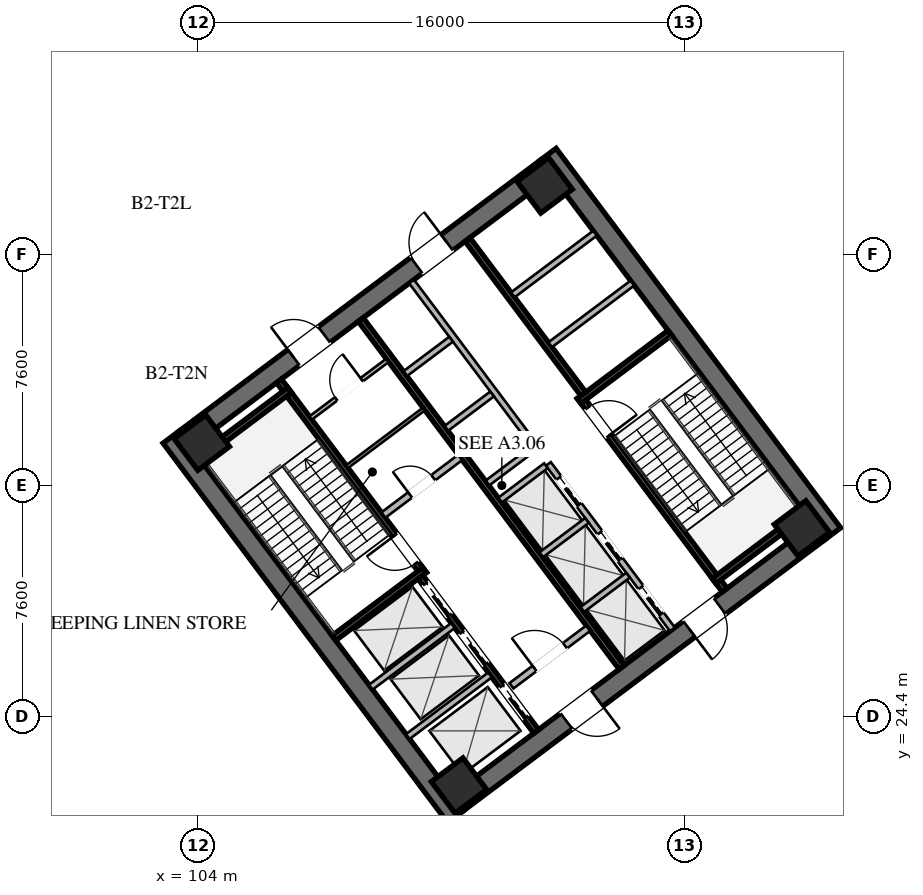
"""IFC4 building model, lengths in metres.
Left out: names, types, materials, properties, quantities, classifications, styles, units other than length and angle.
Written with IfcOpenShell. Run it as: python <this file> out.ifc"""

import sys

from ifc_helpers import new_model, si_unit, direction, frame, frame_2d, origin, origin_2d, place, context, subcontext, project, spatial, rectangle, hollow_rectangle, extrude, element, fill, save


model = new_model("IFC4")
c1 = context("Model", 3, precision=1e-05, world=origin(), true_north=direction((0.0, 1.0)))
c2 = subcontext(c1, "Body", "Model", "MODEL_VIEW")
j1 = project(units=[si_unit("LENGTHUNIT", "METRE"), si_unit("PLANEANGLEUNIT", "RADIAN")], contexts=[c1])
p1 = place(None, origin())
s1 = spatial("IfcSite", under=j1, at=p1, CompositionType="ELEMENT")
p2 = place(p1, origin())
s2 = spatial("IfcBuilding", under=s1, at=p2, CompositionType="ELEMENT")
p3 = place(p2, frame((0.0, 0.0, -11.0)))
s3 = spatial("IfcBuildingStorey", under=s2, at=p3, CompositionType="ELEMENT", Elevation=-11.0)
for number, where, z_axis, x_axis in (
    (1, (112.476, 21.107, 0.0), (0.0, 0.0, 1.0), (-0.6, 0.8, 0.0)),
    (2, (115.524, 42.893, 0.0), (0.0, 0.0, 1.0), (0.6, -0.8, 0.0)),
):
    element("IfcWall", number, at=place(p3, frame(where, z_axis=z_axis, x_axis=x_axis)), inside=s3, PredefinedType="SHEAR", context=c2, shape_type="SweptSolid", body=[
        extrude(rectangle(XDim=15.6, YDim=0.65, at=frame_2d((7.8, 0.0))), origin(), (0.0, 0.0, 1.0), 5.5),
    ])
p4 = place(p3, frame((124.429, 30.478, 0.0), z_axis=(0.0, 0.0, 1.0), x_axis=(-0.799998028465, -0.600002628705, 0.0)))
e3 = element("IfcWall", 3, at=p4, inside=s3, PredefinedType="SHEAR", context=c2, shape_type="SweptSolid", body=[
    extrude(rectangle(XDim=14.86, YDim=0.65, at=frame_2d((7.43, 0.0))), origin(), (0.0, 0.0, 1.0), 5.5),
])
p5 = place(p4, frame((9.13, 0.0, 0.0)))
e4 = element("IfcOpeningElement", 4, at=p5, cuts=e3, PredefinedType="OPENING", context=c2, shape_type="SweptSolid", body=[
    extrude(rectangle(XDim=1.25, YDim=2.25, at=frame_2d((0.625, 1.125))), frame((0.0, 0.335, 0.0), z_axis=(0.0, -1.0, 0.0), x_axis=(1.0, 0.0, 0.0)), (0.0, 0.0, 1.0), 0.67),
])
p6 = place(p4, frame((4.08, 0.0, 0.0)))
e5 = element("IfcOpeningElement", 5, at=p6, cuts=e3, PredefinedType="OPENING", context=c2, shape_type="SweptSolid", body=[
    extrude(rectangle(XDim=1.25, YDim=2.25, at=frame_2d((0.625, 1.125))), frame((0.0, 0.335, 0.0), z_axis=(0.0, -1.0, 0.0), x_axis=(1.0, 0.0, 0.0)), (0.0, 0.0, 1.0), 0.67),
])
p7 = place(p3, frame((103.571, 33.522, 0.0), z_axis=(0.0, 0.0, 1.0), x_axis=(0.799998028465, 0.600002628705, 0.0)))
e6 = element("IfcWall", 6, at=p7, inside=s3, PredefinedType="SHEAR", context=c2, shape_type="SweptSolid", body=[
    extrude(rectangle(XDim=14.86, YDim=0.65, at=frame_2d((7.43, 0.0))), origin(), (0.0, 0.0, 1.0), 5.5),
])
p8 = place(p7, frame((4.48, 0.0, 0.0)))
e7 = element("IfcOpeningElement", 7, at=p8, cuts=e6, PredefinedType="OPENING", context=c2, shape_type="SweptSolid", body=[
    extrude(rectangle(XDim=1.25, YDim=2.25, at=frame_2d((0.625, 1.125))), frame((0.0, 0.335, 0.0), z_axis=(0.0, -1.0, 0.0), x_axis=(1.0, 0.0, 0.0)), (0.0, 0.0, 1.0), 0.67),
])
p9 = place(p7, frame((9.53, 0.0, 0.0)))
e8 = element("IfcOpeningElement", 8, at=p9, cuts=e6, PredefinedType="OPENING", context=c2, shape_type="SweptSolid", body=[
    extrude(rectangle(XDim=1.25, YDim=2.25, at=frame_2d((0.625, 1.125))), frame((0.0, 0.335, 0.0), z_axis=(0.0, -1.0, 0.0), x_axis=(1.0, 0.0, 0.0)), (0.0, 0.0, 1.0), 0.67),
])
for number, where, z_axis, x_axis in (
    (9, (112.59, 22.13, 0.0), (0.0, 0.0, 1.0), (0.8, 0.6, 0.0)),
    (10, (123.87, 30.59, 0.0), (0.0, 0.0, 1.0), (0.8, 0.6, 0.0)),
    (11, (115.41, 41.87, 0.0), (0.0, 0.0, 1.0), (0.8, 0.6, 0.0)),
    (12, (104.13, 33.41, 0.0), (0.0, 0.0, 1.0), (0.8, 0.6, 0.0)),
):
    element("IfcColumn", number, at=place(p3, frame(where, z_axis=z_axis, x_axis=x_axis)), inside=s3, PredefinedType="COLUMN", context=c2, shape_type="SweptSolid", body=[
        extrude(hollow_rectangle(XDim=1.3, YDim=1.3, WallThickness=0.05, at=origin_2d()), origin(), (0.0, 0.0, 1.0), 5.24),
    ])
p10 = place(p3, frame((111.44, 29.08, 0.0), z_axis=(0.0, 0.0, 1.0), x_axis=(-0.600009827119, 0.799992629566, 0.0)))
e13 = element("IfcWall", 13, at=p10, inside=s3, PredefinedType="SHEAR", context=c2, shape_type="SweptSolid", body=[
    extrude(rectangle(XDim=7.95, YDim=0.2, at=frame_2d((3.975, 0.0))), origin(), (0.0, 0.0, 1.0), 5.24),
])
p11 = place(p10, frame((0.45, 0.0, 0.0)))
e14 = element("IfcOpeningElement", 14, at=p11, cuts=e13, PredefinedType="OPENING", context=c2, shape_type="SweptSolid", body=[
    extrude(rectangle(XDim=1.15, YDim=2.2, at=frame_2d((0.575, 1.1))), frame((0.0, 0.11, 0.0), z_axis=(0.0, -1.0, 0.0), x_axis=(1.0, 0.0, 0.0)), (0.0, 0.0, 1.0), 0.22),
])
for number, where, z_axis, x_axis in (
    (15, (108.476, 26.982, 0.0), (0.0, 0.0, 1.0), (0.8, 0.6, 0.0)),
    (16, (104.036, 32.902, 0.0), (0.0, 0.0, 1.0), (0.8, 0.6, 0.0)),
):
    element("IfcWall", number, at=place(p3, frame(where, z_axis=z_axis, x_axis=x_axis)), inside=s3, PredefinedType="SHEAR", context=c2, shape_type="SweptSolid", body=[
        extrude(rectangle(XDim=3.73, YDim=0.2, at=frame_2d((1.865, 0.0))), origin(), (0.0, 0.0, 1.0), 5.24),
    ])
p12 = place(p3, frame((116.56, 34.92, 0.0), z_axis=(0.0, 0.0, 1.0), x_axis=(0.600009827119, -0.799992629566, 0.0)))
e17 = element("IfcWall", 17, at=p12, inside=s3, PredefinedType="SHEAR", context=c2, shape_type="SweptSolid", body=[
    extrude(rectangle(XDim=7.95, YDim=0.2, at=frame_2d((3.975, 0.0))), origin(), (0.0, 0.0, 1.0), 5.24),
])
p13 = place(p12, frame((0.45, 0.0, 0.0)))
e18 = element("IfcOpeningElement", 18, at=p13, cuts=e17, PredefinedType="OPENING", context=c2, shape_type="SweptSolid", body=[
    extrude(rectangle(XDim=1.15, YDim=2.2, at=frame_2d((0.575, 1.1))), frame((0.0, 0.11, 0.0), z_axis=(0.0, -1.0, 0.0), x_axis=(1.0, 0.0, 0.0)), (0.0, 0.0, 1.0), 0.22),
])
for number, where, z_axis, x_axis in (
    (19, (116.54, 34.78, 0.0), (0.0, 0.0, 1.0), (0.8, 0.6, 0.0)),
    (20, (120.98, 28.86, 0.0), (0.0, 0.0, 1.0), (0.8, 0.6, 0.0)),
):
    element("IfcWall", number, at=place(p3, frame(where, z_axis=z_axis, x_axis=x_axis)), inside=s3, PredefinedType="SHEAR", context=c2, shape_type="SweptSolid", body=[
        extrude(rectangle(XDim=3.73, YDim=0.2, at=frame_2d((1.865, 0.0))), origin(), (0.0, 0.0, 1.0), 5.24),
    ])
p14 = place(p3, frame((117.938, 26.016, 0.0), z_axis=(0.0, 0.0, 1.0), x_axis=(-0.600005463273, 0.799995902516, 0.0)))
e21 = element("IfcWall", 21, at=p14, inside=s3, PredefinedType="SHEAR", context=c2, shape_type="SweptSolid", body=[
    extrude(rectangle(XDim=14.3, YDim=0.2, at=frame_2d((7.15, 0.0))), origin(), (0.0, 0.0, 1.0), 5.24),
])
p15 = place(p3, frame((110.104, 31.028, 0.0), z_axis=(0.0, 0.0, 1.0), x_axis=(0.800018601094, 0.59997519774, 0.0)))
e22 = element("IfcWall", 22, at=p15, inside=s3, PredefinedType="SOLIDWALL", context=c2, shape_type="SweptSolid", body=[
    extrude(rectangle(XDim=3.15, YDim=0.22, at=frame_2d((1.575, 0.0))), origin(), (0.0, 0.0, 1.0), 4.283),
])
p16 = place(p15, frame((1.1, 0.0, 0.0)))
e23 = element("IfcOpeningElement", 23, at=p16, cuts=e22, PredefinedType="OPENING", context=c2, shape_type="SweptSolid", body=[
    extrude(rectangle(XDim=0.95, YDim=2.05, at=frame_2d((0.475, 1.025))), frame((0.0, 0.12, 0.0), z_axis=(0.0, -1.0, 0.0), x_axis=(1.0, 0.0, 0.0)), (0.0, 0.0, 1.0), 0.24),
])
p17 = place(p3, frame((114.316, 25.412, 0.0), z_axis=(0.0, 0.0, 1.0), x_axis=(0.800018601094, 0.59997519774, 0.0)))
e24 = element("IfcWall", 24, at=p17, inside=s3, PredefinedType="SOLIDWALL", context=c2, shape_type="SweptSolid", body=[
    extrude(rectangle(XDim=3.15, YDim=0.22, at=frame_2d((1.575, 0.0))), origin(), (0.0, 0.0, 1.0), 4.283),
])
p18 = place(p17, frame((0.95, 0.0, 0.0)))
e25 = element("IfcOpeningElement", 25, at=p18, cuts=e24, PredefinedType="OPENING", context=c2, shape_type="SweptSolid", body=[
    extrude(rectangle(XDim=1.25, YDim=2.25, at=frame_2d((0.625, 1.125))), frame((0.0, 0.12, 0.0), z_axis=(0.0, -1.0, 0.0), x_axis=(1.0, 0.0, 0.0)), (0.0, 0.0, 1.0), 0.24),
])
p19 = place(p3, frame((115.13, 23.91, 0.0), z_axis=(0.0, 0.0, 1.0), x_axis=(-0.599975393228, 0.800018454488, 0.0)))
e26 = element("IfcWall", 26, at=p19, inside=s3, PredefinedType="SHEAR", context=c2, shape_type="SweptSolid", body=[
    extrude(rectangle(XDim=6.35, YDim=0.2, at=frame_2d((3.175, 0.0))), origin(), (0.0, 0.0, 1.0), 5.24),
])
p20 = place(p19, frame((4.775, 0.0, 0.0)))
e27 = element("IfcOpeningElement", 27, at=p20, cuts=e26, PredefinedType="OPENING", context=c2, shape_type="SweptSolid", body=[
    extrude(rectangle(XDim=1.3, YDim=2.25, at=frame_2d((0.65, 1.125))), frame((0.0, 0.11, 0.0), z_axis=(0.0, -1.0, 0.0), x_axis=(1.0, 0.0, 0.0)), (0.0, 0.0, 1.0), 0.22),
])
p21 = place(p19, frame((2.775, 0.0, 0.0)))
e28 = element("IfcOpeningElement", 28, at=p21, cuts=e26, PredefinedType="OPENING", context=c2, shape_type="SweptSolid", body=[
    extrude(rectangle(XDim=1.3, YDim=2.25, at=frame_2d((0.65, 1.125))), frame((0.0, 0.11, 0.0), z_axis=(0.0, -1.0, 0.0), x_axis=(1.0, 0.0, 0.0)), (0.0, 0.0, 1.0), 0.22),
])
p22 = place(p19, frame((0.575, 0.0, 0.0)))
e29 = element("IfcOpeningElement", 29, at=p22, cuts=e26, PredefinedType="OPENING", context=c2, shape_type="SweptSolid", body=[
    extrude(rectangle(XDim=1.3, YDim=2.25, at=frame_2d((0.65, 1.125))), frame((0.0, 0.11, 0.0), z_axis=(0.0, -1.0, 0.0), x_axis=(1.0, 0.0, 0.0)), (0.0, 0.0, 1.0), 0.22),
])
for number, where, z_axis, x_axis in (
    (30, (110.906, 23.742, 0.0), (0.0, 0.0, 1.0), (0.8, 0.6, 0.0)),
    (31, (109.688, 25.366, 0.0), (0.0, 0.0, 1.0), (0.8, 0.6, 0.0)),
):
    element("IfcWall", number, at=place(p3, frame(where, z_axis=z_axis, x_axis=x_axis)), inside=s3, PredefinedType="SOLIDWALL", context=c2, shape_type="SweptSolid", body=[
        extrude(rectangle(XDim=3.38, YDim=0.2, at=frame_2d((1.69, 0.0))), origin(), (0.0, 0.0, 1.0), 5.24),
    ])
p23 = place(p3, frame((112.87, 40.09, 0.0), z_axis=(0.0, 0.0, 1.0), x_axis=(0.599975393228, -0.800018454488, 0.0)))
e32 = element("IfcWall", 32, at=p23, inside=s3, PredefinedType="SHEAR", context=c2, shape_type="SweptSolid", body=[
    extrude(rectangle(XDim=6.35, YDim=0.2, at=frame_2d((3.175, 0.0))), origin(), (0.0, 0.0, 1.0), 5.24),
])
for number, where, z_axis, x_axis in (
    (33, (115.59, 36.63, 0.0), (0.0, 0.0, 1.0), (0.8, 0.6, 0.0)),
    (34, (114.36, 38.27, 0.0), (0.0, 0.0, 1.0), (0.8, 0.6, 0.0)),
):
    element("IfcWall", number, at=place(p3, frame(where, z_axis=z_axis, x_axis=x_axis)), inside=s3, PredefinedType="SOLIDWALL", context=c2, shape_type="SweptSolid", body=[
        extrude(rectangle(XDim=3.38, YDim=0.2, at=frame_2d((1.69, 0.0))), origin(), (0.0, 0.0, 1.0), 5.24),
    ])
p24 = place(p3, frame((107.71, 34.22, 0.0), z_axis=(0.0, 0.0, 1.0), x_axis=(0.799981399002, 0.60002480053, 0.0)))
e35 = element("IfcWall", 35, at=p24, inside=s3, PredefinedType="PARTITIONING", context=c2, shape_type="SweptSolid", body=[
    extrude(rectangle(XDim=3.15, YDim=0.135, at=frame_2d((1.575, 0.0))), origin(), (0.0, 0.0, 1.0), 4.283),
])
p25 = place(p24, frame((1.05, 0.0, 0.0)))
e36 = element("IfcOpeningElement", 36, at=p25, cuts=e35, PredefinedType="OPENING", context=c2, shape_type="SweptSolid", body=[
    extrude(rectangle(XDim=1.05, YDim=2.2, at=frame_2d((0.525, 1.1))), frame((0.0, 0.077, 0.0), z_axis=(0.0, -1.0, 0.0), x_axis=(1.0, 0.0, 0.0)), (0.0, 0.0, 1.0), 0.155),
])
p26 = place(p3, frame((108.91, 32.62, 0.0), z_axis=(0.0, 0.0, 1.0), x_axis=(0.800018601094, 0.59997519774, 0.0)))
e37 = element("IfcWall", 37, at=p26, inside=s3, PredefinedType="PARTITIONING", context=c2, shape_type="SweptSolid", body=[
    extrude(rectangle(XDim=3.15, YDim=0.11, at=frame_2d((1.575, 0.0))), origin(), (0.0, 0.0, 1.0), 4.283),
])
p27 = place(p3, frame((119.61, 27.27, 0.0), z_axis=(0.0, 0.0, 1.0), x_axis=(-0.600011488909, 0.79999138319, 0.0)))
e38 = element("IfcWall", 38, at=p27, inside=s3, PredefinedType="SOLIDWALL", context=c2, shape_type="SweptSolid", body=[
    extrude(rectangle(XDim=6.8, YDim=0.2, at=frame_2d((3.4, 0.0))), origin(), (0.0, 0.0, 1.0), 5.24),
])
p28 = place(p27, frame((0.625, 0.0, 0.0)))
e39 = element("IfcOpeningElement", 39, at=p28, cuts=e38, PredefinedType="OPENING", context=c2, shape_type="SweptSolid", body=[
    extrude(rectangle(XDim=1.1, YDim=2.2, at=frame_2d((0.55, 1.1))), frame((0.0, 0.11, 0.0), z_axis=(0.0, -1.0, 0.0), x_axis=(1.0, 0.0, 0.0)), (0.0, 0.0, 1.0), 0.22),
])
p29 = place(p27, frame((2.875, 0.0, 0.0)))
e40 = element("IfcOpeningElement", 40, at=p29, cuts=e38, PredefinedType="OPENING", context=c2, shape_type="SweptSolid", body=[
    extrude(rectangle(XDim=1.1, YDim=2.2, at=frame_2d((0.55, 1.1))), frame((0.0, 0.11, 0.0), z_axis=(0.0, -1.0, 0.0), x_axis=(1.0, 0.0, 0.0)), (0.0, 0.0, 1.0), 0.22),
])
p30 = place(p27, frame((5.125, 0.0, 0.0)))
e41 = element("IfcOpeningElement", 41, at=p30, cuts=e38, PredefinedType="OPENING", context=c2, shape_type="SweptSolid", body=[
    extrude(rectangle(XDim=1.1, YDim=2.2, at=frame_2d((0.55, 1.1))), frame((0.0, 0.11, 0.0), z_axis=(0.0, -1.0, 0.0), x_axis=(1.0, 0.0, 0.0)), (0.0, 0.0, 1.0), 0.22),
])
p31 = place(p3, frame((116.646, 27.922, 0.0), z_axis=(0.0, 0.0, 1.0), x_axis=(0.8, 0.6, 0.0)))
e42 = element("IfcWall", 42, at=p31, inside=s3, PredefinedType="SOLIDWALL", context=c2, shape_type="SweptSolid", body=[
    extrude(rectangle(XDim=1.88, YDim=0.2, at=frame_2d((0.94, 0.0))), origin(), (0.0, 0.0, 1.0), 5.24),
])
p32 = place(p3, frame((115.296, 29.722, 0.0), z_axis=(0.0, 0.0, 1.0), x_axis=(0.799984418148, 0.600020775241, 0.0)))
e43 = element("IfcWall", 43, at=p32, inside=s3, PredefinedType="SOLIDWALL", context=c2, shape_type="SweptSolid", body=[
    extrude(rectangle(XDim=1.88, YDim=0.2, at=frame_2d((0.94, 0.0))), origin(), (0.0, 0.0, 1.0), 5.24),
])
p33 = place(p3, frame((113.946, 31.522, 0.0), z_axis=(0.0, 0.0, 1.0), x_axis=(0.8, 0.6, 0.0)))
e44 = element("IfcWall", 44, at=p33, inside=s3, PredefinedType="SOLIDWALL", context=c2, shape_type="SweptSolid", body=[
    extrude(rectangle(XDim=1.88, YDim=0.2, at=frame_2d((0.94, 0.0))), origin(), (0.0, 0.0, 1.0), 5.24),
])
p34 = place(p3, frame((115.11, 33.27, 0.0), z_axis=(0.0, 0.0, 1.0), x_axis=(-0.600011488909, 0.79999138319, 0.0)))
e45 = element("IfcWall", 45, at=p34, inside=s3, PredefinedType="SOLIDWALL", context=c2, shape_type="SweptSolid", body=[
    extrude(rectangle(XDim=6.8, YDim=0.2, at=frame_2d((3.4, 0.0))), origin(), (0.0, 0.0, 1.0), 5.24),
])
p35 = place(p3, frame((113.526, 32.082, 0.0), z_axis=(0.0, 0.0, 1.0), x_axis=(0.800046745961, 0.599937666993, 0.0)))
e46 = element("IfcWall", 46, at=p35, inside=s3, PredefinedType="SOLIDWALL", context=c2, shape_type="SweptSolid", body=[
    extrude(rectangle(XDim=1.88, YDim=0.2, at=frame_2d((0.94, 0.0))), origin(), (0.0, 0.0, 1.0), 5.24),
])
p36 = place(p3, frame((112.176, 33.882, 0.0), z_axis=(0.0, 0.0, 1.0), x_axis=(0.8, 0.6, 0.0)))
e47 = element("IfcWall", 47, at=p36, inside=s3, PredefinedType="SOLIDWALL", context=c2, shape_type="SweptSolid", body=[
    extrude(rectangle(XDim=1.88, YDim=0.2, at=frame_2d((0.94, 0.0))), origin(), (0.0, 0.0, 1.0), 5.24),
])
p37 = place(p3, frame((110.826, 35.682, 0.0), z_axis=(0.0, 0.0, 1.0), x_axis=(0.799984418148, 0.600020775241, 0.0)))
e48 = element("IfcWall", 48, at=p37, inside=s3, PredefinedType="SOLIDWALL", context=c2, shape_type="SweptSolid", body=[
    extrude(rectangle(XDim=1.88, YDim=0.2, at=frame_2d((0.94, 0.0))), origin(), (0.0, 0.0, 1.0), 5.24),
])
p38 = place(p8, origin())
e49 = element("IfcDoor", 49, at=p38, inside=s3, OperationType="SINGLE_SWING_LEFT", PredefinedType="DOOR", context=c2, shape_type="SweptSolid", body=[
    extrude(rectangle(XDim=1.25, YDim=2.25, at=frame_2d((0.625, 1.125))), frame((0.0, 0.025, 0.0), z_axis=(0.0, -1.0, 0.0), x_axis=(1.0, 0.0, 0.0)), (0.0, 0.0, 1.0), 0.05),
])
fill(e7, e49)
p39 = place(p9, origin())
e50 = element("IfcDoor", 50, at=p39, inside=s3, OperationType="SINGLE_SWING_RIGHT", PredefinedType="DOOR", context=c2, shape_type="SweptSolid", body=[
    extrude(rectangle(XDim=1.25, YDim=2.25, at=frame_2d((0.625, 1.125))), frame((0.0, 0.025, 0.0), z_axis=(0.0, -1.0, 0.0), x_axis=(1.0, 0.0, 0.0)), (0.0, 0.0, 1.0), 0.05),
])
fill(e8, e50)
p40 = place(p5, origin())
e51 = element("IfcDoor", 51, at=p40, inside=s3, OperationType="SINGLE_SWING_LEFT", PredefinedType="DOOR", context=c2, shape_type="SweptSolid", body=[
    extrude(rectangle(XDim=1.25, YDim=2.25, at=frame_2d((0.625, 1.125))), frame((0.0, 0.025, 0.0), z_axis=(0.0, -1.0, 0.0), x_axis=(1.0, 0.0, 0.0)), (0.0, 0.0, 1.0), 0.05),
])
fill(e4, e51)
p41 = place(p6, origin())
e52 = element("IfcDoor", 52, at=p41, inside=s3, OperationType="SINGLE_SWING_RIGHT", PredefinedType="DOOR", context=c2, shape_type="SweptSolid", body=[
    extrude(rectangle(XDim=1.25, YDim=2.25, at=frame_2d((0.625, 1.125))), frame((0.0, 0.025, 0.0), z_axis=(0.0, -1.0, 0.0), x_axis=(1.0, 0.0, 0.0)), (0.0, 0.0, 1.0), 0.05),
])
fill(e5, e52)
p42 = place(p11, origin())
e53 = element("IfcDoor", 53, at=p42, inside=s3, OperationType="SINGLE_SWING_RIGHT", PredefinedType="DOOR", context=c2, shape_type="SweptSolid", body=[
    extrude(rectangle(XDim=1.15, YDim=2.2, at=frame_2d((0.575, 1.1))), frame((0.0, 0.025, 0.0), z_axis=(0.0, -1.0, 0.0), x_axis=(1.0, 0.0, 0.0)), (0.0, 0.0, 1.0), 0.05),
])
fill(e14, e53)
p43 = place(p13, origin())
e54 = element("IfcDoor", 54, at=p43, inside=s3, OperationType="SINGLE_SWING_RIGHT", PredefinedType="DOOR", context=c2, shape_type="SweptSolid", body=[
    extrude(rectangle(XDim=1.15, YDim=2.2, at=frame_2d((0.575, 1.1))), frame((0.0, 0.025, 0.0), z_axis=(0.0, -1.0, 0.0), x_axis=(1.0, 0.0, 0.0)), (0.0, 0.0, 1.0), 0.05),
])
fill(e18, e54)
p44 = place(p18, origin())
e55 = element("IfcDoor", 55, at=p44, inside=s3, OperationType="SINGLE_SWING_LEFT", PredefinedType="DOOR", context=c2, shape_type="SweptSolid", body=[
    extrude(rectangle(XDim=1.25, YDim=2.25, at=frame_2d((0.625, 1.125))), frame((0.0, 0.025, 0.0), z_axis=(0.0, -1.0, 0.0), x_axis=(1.0, 0.0, 0.0)), (0.0, 0.0, 1.0), 0.05),
])
fill(e25, e55)
p45 = place(p25, origin())
e56 = element("IfcDoor", 56, at=p45, inside=s3, OperationType="SINGLE_SWING_RIGHT", PredefinedType="DOOR", context=c2, shape_type="SweptSolid", body=[
    extrude(rectangle(XDim=1.05, YDim=2.2, at=frame_2d((0.525, 1.1))), frame((0.0, 0.025, 0.0), z_axis=(0.0, -1.0, 0.0), x_axis=(1.0, 0.0, 0.0)), (0.0, 0.0, 1.0), 0.05),
])
fill(e36, e56)
p46 = place(p16, origin())
e57 = element("IfcDoor", 57, at=p46, inside=s3, OperationType="SINGLE_SWING_LEFT", PredefinedType="DOOR", context=c2, shape_type="SweptSolid", body=[
    extrude(rectangle(XDim=0.95, YDim=2.05, at=frame_2d((0.475, 1.025))), frame((0.0, 0.025, 0.0), z_axis=(0.0, -1.0, 0.0), x_axis=(1.0, 0.0, 0.0)), (0.0, 0.0, 1.0), 0.05),
])
fill(e23, e57)
p47 = place(p20, origin())
e58 = element("IfcDoor", 58, at=p47, inside=s3, OperationType="SLIDING_TO_LEFT", PredefinedType="DOOR", context=c2, shape_type="SweptSolid", body=[
    extrude(rectangle(XDim=1.3, YDim=2.25, at=frame_2d((0.65, 1.125))), frame((0.0, 0.025, 0.0), z_axis=(0.0, -1.0, 0.0), x_axis=(1.0, 0.0, 0.0)), (0.0, 0.0, 1.0), 0.05),
])
fill(e27, e58)
p48 = place(p21, origin())
e59 = element("IfcDoor", 59, at=p48, inside=s3, OperationType="SLIDING_TO_LEFT", PredefinedType="DOOR", context=c2, shape_type="SweptSolid", body=[
    extrude(rectangle(XDim=1.3, YDim=2.25, at=frame_2d((0.65, 1.125))), frame((0.0, 0.025, 0.0), z_axis=(0.0, -1.0, 0.0), x_axis=(1.0, 0.0, 0.0)), (0.0, 0.0, 1.0), 0.05),
])
fill(e28, e59)
p49 = place(p22, origin())
e60 = element("IfcDoor", 60, at=p49, inside=s3, OperationType="SLIDING_TO_LEFT", PredefinedType="DOOR", context=c2, shape_type="SweptSolid", body=[
    extrude(rectangle(XDim=1.3, YDim=2.25, at=frame_2d((0.65, 1.125))), frame((0.0, 0.025, 0.0), z_axis=(0.0, -1.0, 0.0), x_axis=(1.0, 0.0, 0.0)), (0.0, 0.0, 1.0), 0.05),
])
fill(e29, e60)
p50 = place(p28, origin())
e61 = element("IfcDoor", 61, at=p50, inside=s3, OperationType="SLIDING_TO_LEFT", PredefinedType="DOOR", context=c2, shape_type="SweptSolid", body=[
    extrude(rectangle(XDim=1.1, YDim=2.2, at=frame_2d((0.55, 1.1))), frame((0.0, 0.025, 0.0), z_axis=(0.0, -1.0, 0.0), x_axis=(1.0, 0.0, 0.0)), (0.0, 0.0, 1.0), 0.05),
])
fill(e39, e61)
p51 = place(p29, origin())
e62 = element("IfcDoor", 62, at=p51, inside=s3, OperationType="SLIDING_TO_LEFT", PredefinedType="DOOR", context=c2, shape_type="SweptSolid", body=[
    extrude(rectangle(XDim=1.1, YDim=2.2, at=frame_2d((0.55, 1.1))), frame((0.0, 0.025, 0.0), z_axis=(0.0, -1.0, 0.0), x_axis=(1.0, 0.0, 0.0)), (0.0, 0.0, 1.0), 0.05),
])
fill(e40, e62)
p52 = place(p30, origin())
e63 = element("IfcDoor", 63, at=p52, inside=s3, OperationType="SLIDING_TO_LEFT", PredefinedType="DOOR", context=c2, shape_type="SweptSolid", body=[
    extrude(rectangle(XDim=1.1, YDim=2.2, at=frame_2d((0.55, 1.1))), frame((0.0, 0.025, 0.0), z_axis=(0.0, -1.0, 0.0), x_axis=(1.0, 0.0, 0.0)), (0.0, 0.0, 1.0), 0.05),
])
fill(e41, e63)
save(model, sys.argv[1])
